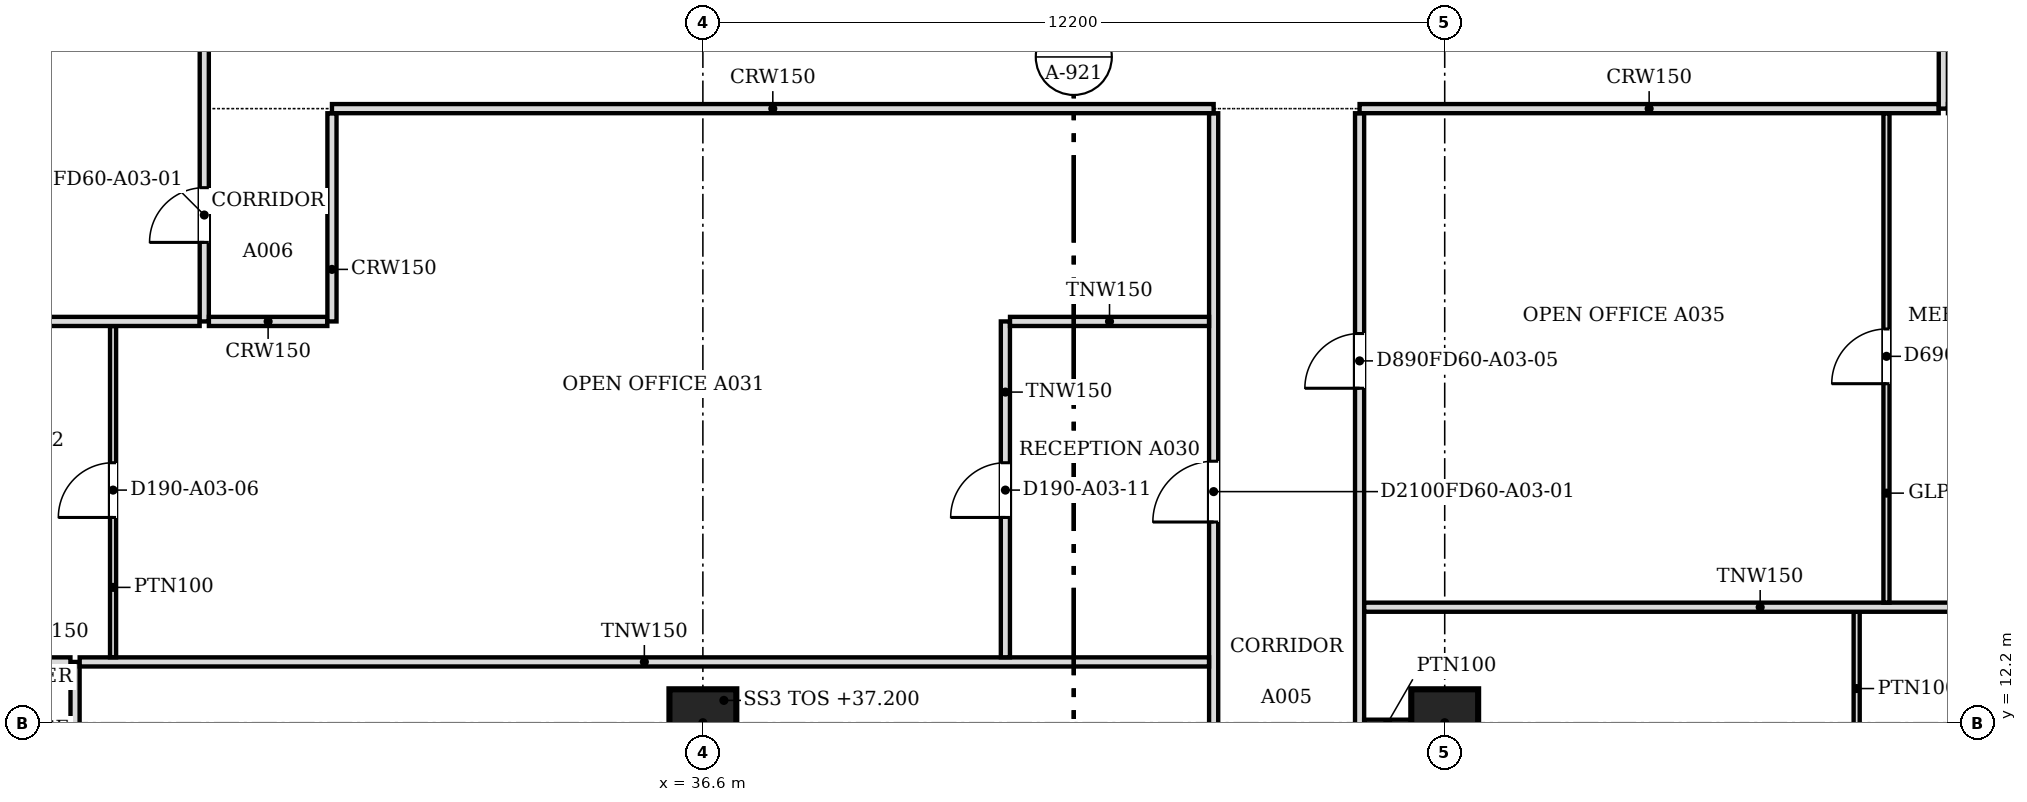
"""IFC4 building model, lengths in metres.
Left out: names, types, materials, properties, quantities, classifications, styles, units other than length and angle.
Written with IfcOpenShell. Run it as: python <this file> out.ifc"""

import sys

from ifc_helpers import new_model, si_unit, direction, frame, frame_2d, origin, origin_2d, place, context, subcontext, project, spatial, rectangle, extrude, source, transform, mapped, element, fill, save


model = new_model("IFC4")
c1 = context("Model", 3, precision=1e-05, world=origin(), true_north=direction((0.0, 1.0)))
c2 = subcontext(c1, "Body", "Model", "MODEL_VIEW")
j1 = project(units=[si_unit("LENGTHUNIT", "METRE"), si_unit("PLANEANGLEUNIT", "RADIAN")], contexts=[c1])
p1 = place(None, origin())
s1 = spatial("IfcSite", under=j1, at=p1, CompositionType="ELEMENT")
p2 = place(p1, origin())
s2 = spatial("IfcBuilding", under=s1, at=p2, CompositionType="ELEMENT")
p3 = place(p2, frame((0.0, 0.0, 37.2)))
s3 = spatial("IfcBuildingStorey", under=s2, at=p3, CompositionType="ELEMENT", Elevation=37.2)
for number, where, z_axis, x_axis in (
    (1, (36.6, 12.2, 0.0), (0.0, 0.0, 1.0), (1.0, 0.0, 0.0)),
    (2, (48.8, 12.2, 0.0), (0.0, 0.0, 1.0), (1.0, 0.0, 0.0)),
):
    element("IfcColumn", number, at=place(p3, frame(where, z_axis=z_axis, x_axis=x_axis)), inside=s3, PredefinedType="COLUMN", context=c2, shape_type="SweptSolid", body=[
        extrude(rectangle(XDim=1.1, YDim=1.1, at=origin_2d()), origin(), (0.0, 0.0, 1.0), 3.6),
    ])
p4 = place(p3, frame((45.0, 0.5, 0.0), z_axis=(0.0, 0.0, 1.0), x_axis=(0.0, 1.0, 0.0)))
e3 = element("IfcWall", 3, at=p4, inside=s3, PredefinedType="PARTITIONING", context=c2, shape_type="SweptSolid", body=[
    extrude(rectangle(XDim=21.724, YDim=0.15, at=frame_2d((10.862, 0.0))), origin(), (0.0, 0.0, 1.0), 3.067),
])
m1 = source(origin(), c2, "Body", "SweptSolid", [
    extrude(rectangle(XDim=1.0, YDim=2.1, at=frame_2d((0.5, 1.05))), frame((0.0, 0.085, 0.0), z_axis=(0.0, -1.0, 0.0), x_axis=(1.0, 0.0, 0.0)), (0.0, 0.0, 1.0), 0.17),
])
p5 = place(p4, frame((15.001, 0.0, 0.0)))
e4 = element("IfcOpeningElement", 4, at=p5, cuts=e3, PredefinedType="OPENING", context=c2, shape_type="MappedRepresentation", body=[
    mapped(m1, transform((0.0, 0.0, 0.0), scale=1.0)),
])
p6 = place(p4, frame((7.7, 0.0, 0.0)))
e5 = element("IfcOpeningElement", 5, at=p6, cuts=e3, PredefinedType="OPENING", context=c2, shape_type="MappedRepresentation", body=[
    mapped(m1, transform((0.0, 0.0, 0.0), scale=1.0)),
])
p7 = place(p3, frame((47.4, 22.224, 0.0), z_axis=(0.0, 0.0, 1.0), x_axis=(0.0, -1.0, 0.0)))
e6 = element("IfcWall", 6, at=p7, inside=s3, PredefinedType="PARTITIONING", context=c2, shape_type="SweptSolid", body=[
    extrude(rectangle(XDim=18.024, YDim=0.15, at=frame_2d((9.012, 0.0))), origin(), (0.0, 0.0, 1.0), 3.067),
])
m2 = source(origin(), c2, "Body", "SweptSolid", [
    extrude(rectangle(XDim=0.9, YDim=2.1, at=frame_2d((0.45, 1.05))), frame((0.0, 0.085, 0.0), z_axis=(0.0, -1.0, 0.0), x_axis=(1.0, 0.0, 0.0)), (0.0, 0.0, 1.0), 0.17),
])
p8 = place(p7, frame((3.623, 0.0, 0.0)))
e7 = element("IfcOpeningElement", 7, at=p8, cuts=e6, PredefinedType="OPENING", context=c2, shape_type="MappedRepresentation", body=[
    mapped(m2, transform((0.0, 0.0, 0.0), scale=1.0)),
])
p9 = place(p7, frame((12.624, 0.0, 0.0)))
e8 = element("IfcOpeningElement", 8, at=p9, cuts=e6, PredefinedType="OPENING", context=c2, shape_type="MappedRepresentation", body=[
    mapped(m2, transform((0.0, 0.0, 0.0), scale=1.0)),
])
p10 = place(p3, frame((55.575, 14.024, 0.0), z_axis=(0.0, 0.0, 1.0), x_axis=(0.0, -1.0, 0.0)))
e9 = element("IfcWall", 9, at=p10, inside=s3, PredefinedType="PARTITIONING", context=c2, shape_type="SweptSolid", body=[
    extrude(rectangle(XDim=5.924, YDim=0.1, at=frame_2d((2.962, 0.0))), origin(), (0.0, 0.0, 1.0), 3.067),
])
m3 = source(origin(), c2, "Body", "SweptSolid", [
    extrude(rectangle(XDim=0.9, YDim=2.1, at=frame_2d((0.45, 1.05))), frame((0.0, 0.06, 0.0), z_axis=(0.0, -1.0, 0.0), x_axis=(1.0, 0.0, 0.0)), (0.0, 0.0, 1.0), 0.12),
])
p11 = place(p10, frame((2.524, 0.0, 0.0)))
e10 = element("IfcOpeningElement", 10, at=p11, cuts=e9, PredefinedType="OPENING", context=c2, shape_type="MappedRepresentation", body=[
    mapped(m3, transform((0.0, 0.0, 0.0), scale=1.0)),
])
p12 = place(p3, frame((26.275, 8.548, 0.0), z_axis=(0.0, 0.0, 1.0), x_axis=(0.0, 1.0, 0.0)))
e11 = element("IfcWall", 11, at=p12, inside=s3, PredefinedType="PARTITIONING", context=c2, shape_type="SweptSolid", body=[
    extrude(rectangle(XDim=4.652, YDim=0.15, at=frame_2d((2.326, 0.0))), origin(), (0.0, 0.0, 1.0), 3.067),
])
p13 = place(p12, frame((1.9, 0.0, 0.0)))
e12 = element("IfcOpeningElement", 12, at=p13, cuts=e11, PredefinedType="OPENING", context=c2, shape_type="MappedRepresentation", body=[
    mapped(m2, transform((0.0, 0.0, 0.0), scale=1.0)),
])
p14 = place(p3, frame((48.25, 12.2, 0.0), z_axis=(0.0, 0.0, 1.0), x_axis=(-1.0, 0.0, 0.0)))
e13 = element("IfcWall", 13, at=p14, inside=s3, PredefinedType="PARTITIONING", context=c2, shape_type="SweptSolid", body=[
    extrude(rectangle(XDim=0.775, YDim=0.1, at=frame_2d((0.387, 0.0))), origin(), (0.0, 0.0, 1.0), 3.067),
])
p15 = place(p3, frame((24.55, 13.2, 0.0), z_axis=(0.0, 0.0, 1.0), x_axis=(1.0, 0.0, 0.0)))
e14 = element("IfcWall", 14, at=p15, inside=s3, PredefinedType="PARTITIONING", context=c2, shape_type="SweptSolid", body=[
    extrude(rectangle(XDim=1.649, YDim=0.15, at=frame_2d((0.824, 0.0))), origin(), (0.0, 0.0, 1.0), 3.067),
])
p16 = place(p3, frame((26.351, 13.2, 0.0), z_axis=(0.0, 0.0, 1.0), x_axis=(1.0, 0.0, 0.0)))
e15 = element("IfcWall", 15, at=p16, inside=s3, PredefinedType="PARTITIONING", context=c2, shape_type="SweptSolid", body=[
    extrude(rectangle(XDim=18.573, YDim=0.15, at=frame_2d((9.287, 0.0))), origin(), (0.0, 0.0, 1.0), 3.067),
])
p17 = place(p3, frame((26.9, 13.276, 0.0), z_axis=(0.0, 0.0, 1.0), x_axis=(0.0, 1.0, 0.0)))
e16 = element("IfcWall", 16, at=p17, inside=s3, PredefinedType="PARTITIONING", context=c2, shape_type="SweptSolid", body=[
    extrude(rectangle(XDim=5.448, YDim=0.1, at=frame_2d((2.724, 0.0))), origin(), (0.0, 0.0, 1.0), 3.067),
])
p18 = place(p17, frame((2.3, 0.0, 0.0)))
e17 = element("IfcOpeningElement", 17, at=p18, cuts=e16, PredefinedType="OPENING", context=c2, shape_type="MappedRepresentation", body=[
    mapped(m3, transform((0.0, 0.0, 0.0), scale=1.0)),
])
p19 = place(p3, frame((41.575, 13.276, 0.0), z_axis=(0.0, 0.0, 1.0), x_axis=(0.0, 1.0, 0.0)))
e18 = element("IfcWall", 18, at=p19, inside=s3, PredefinedType="PARTITIONING", context=c2, shape_type="SweptSolid", body=[
    extrude(rectangle(XDim=5.524, YDim=0.15, at=frame_2d((2.762, 0.0))), origin(), (0.0, 0.0, 1.0), 3.067),
])
p20 = place(p19, frame((2.3, 0.0, 0.0)))
e19 = element("IfcOpeningElement", 19, at=p20, cuts=e18, PredefinedType="OPENING", context=c2, shape_type="MappedRepresentation", body=[
    mapped(m2, transform((0.0, 0.0, 0.0), scale=1.0)),
])
p21 = place(p3, frame((47.476, 14.1, 0.0), z_axis=(0.0, 0.0, 1.0), x_axis=(1.0, 0.0, 0.0)))
e20 = element("IfcWall", 20, at=p21, inside=s3, PredefinedType="PARTITIONING", context=c2, shape_type="SweptSolid", body=[
    extrude(rectangle(XDim=13.024, YDim=0.15, at=frame_2d((6.512, 0.0))), origin(), (0.0, 0.0, 1.0), 3.067),
])
p22 = place(p3, frame((56.065, 22.224, 0.0), z_axis=(0.0, 0.0, 1.0), x_axis=(0.0, -1.0, 0.0)))
e21 = element("IfcWall", 21, at=p22, inside=s3, PredefinedType="PARTITIONING", context=c2, shape_type="SweptSolid", body=[
    extrude(rectangle(XDim=8.048, YDim=0.1, at=frame_2d((4.024, 0.0))), origin(), (0.0, 0.0, 1.0), 3.067),
])
p23 = place(p22, frame((3.548, 0.0, 0.0)))
e22 = element("IfcOpeningElement", 22, at=p23, cuts=e21, PredefinedType="OPENING", context=c2, shape_type="MappedRepresentation", body=[
    mapped(m3, transform((0.0, 0.0, 0.0), scale=1.0)),
])
p24 = place(p3, frame((22.0, 18.8, 0.0), z_axis=(0.0, 0.0, 1.0), x_axis=(1.0, 0.0, 0.0)))
e23 = element("IfcWall", 23, at=p24, inside=s3, PredefinedType="PARTITIONING", context=c2, shape_type="SweptSolid", body=[
    extrude(rectangle(XDim=6.324, YDim=0.15, at=frame_2d((3.162, 0.0))), origin(), (0.0, 0.0, 1.0), 3.067),
])
p25 = place(p3, frame((28.4, 18.8, 0.0), z_axis=(0.0, 0.0, 1.0), x_axis=(0.0, 1.0, 0.0)))
e24 = element("IfcWall", 24, at=p25, inside=s3, PredefinedType="PARTITIONING", context=c2, shape_type="SweptSolid", body=[
    extrude(rectangle(XDim=26.824, YDim=0.15, at=frame_2d((13.412, 0.0))), origin(), (0.0, 0.0, 1.0), 3.067),
])
p26 = place(p25, frame((1.3, 0.0, 0.0)))
e25 = element("IfcOpeningElement", 25, at=p26, cuts=e24, PredefinedType="OPENING", context=c2, shape_type="MappedRepresentation", body=[
    mapped(m2, transform((0.0, 0.0, 0.0), scale=1.0)),
])
p27 = place(p25, frame((14.301, 0.0, 0.0)))
e26 = element("IfcOpeningElement", 26, at=p27, cuts=e24, PredefinedType="OPENING", context=c2, shape_type="MappedRepresentation", body=[
    mapped(m2, transform((0.0, 0.0, 0.0), scale=1.0)),
])
p28 = place(p25, frame((8.2, 0.0, 0.0)))
e27 = element("IfcOpeningElement", 27, at=p28, cuts=e24, PredefinedType="OPENING", context=c2, shape_type="MappedRepresentation", body=[
    mapped(m2, transform((0.0, 0.0, 0.0), scale=1.0)),
])
p29 = place(p25, frame((21.9, 0.0, 0.0)))
e28 = element("IfcOpeningElement", 28, at=p29, cuts=e24, PredefinedType="OPENING", context=c2, shape_type="MappedRepresentation", body=[
    mapped(m2, transform((0.0, 0.0, 0.0), scale=1.0)),
])
p30 = place(p3, frame((28.476, 18.8, 0.0), z_axis=(0.0, 0.0, 1.0), x_axis=(1.0, 0.0, 0.0)))
e29 = element("IfcWall", 29, at=p30, inside=s3, PredefinedType="PARTITIONING", context=c2, shape_type="SweptSolid", body=[
    extrude(rectangle(XDim=1.948, YDim=0.15, at=frame_2d((0.974, 0.0))), origin(), (0.0, 0.0, 1.0), 3.067),
])
p31 = place(p3, frame((30.5, 18.8, 0.0), z_axis=(0.0, 0.0, 1.0), x_axis=(0.0, 1.0, 0.0)))
e30 = element("IfcWall", 30, at=p31, inside=s3, PredefinedType="PARTITIONING", context=c2, shape_type="SweptSolid", body=[
    extrude(rectangle(XDim=3.424, YDim=0.15, at=frame_2d((1.712, 0.0))), origin(), (0.0, 0.0, 1.0), 3.067),
])
p32 = place(p3, frame((41.651, 18.8, 0.0), z_axis=(0.0, 0.0, 1.0), x_axis=(1.0, 0.0, 0.0)))
e31 = element("IfcWall", 31, at=p32, inside=s3, PredefinedType="PARTITIONING", context=c2, shape_type="SweptSolid", body=[
    extrude(rectangle(XDim=3.273, YDim=0.15, at=frame_2d((1.637, 0.0))), origin(), (0.0, 0.0, 1.0), 3.067),
])
p33 = place(p3, frame((30.5, 22.3, 0.0), z_axis=(0.0, 0.0, 1.0), x_axis=(1.0, 0.0, 0.0)))
e32 = element("IfcWall", 32, at=p33, inside=s3, PredefinedType="PARTITIONING", context=c2, shape_type="SweptSolid", body=[
    extrude(rectangle(XDim=14.5, YDim=0.15, at=frame_2d((7.25, 0.0))), origin(), (0.0, 0.0, 1.0), 3.067),
])
p34 = place(p3, frame((47.4, 22.3, 0.0), z_axis=(0.0, 0.0, 1.0), x_axis=(1.0, 0.0, 0.0)))
e33 = element("IfcWall", 33, at=p34, inside=s3, PredefinedType="PARTITIONING", context=c2, shape_type="SweptSolid", body=[
    extrude(rectangle(XDim=9.524, YDim=0.15, at=frame_2d((4.762, 0.0))), origin(), (0.0, 0.0, 1.0), 3.067),
])
p35 = place(p3, frame((57.0, 30.6, 0.0), z_axis=(0.0, 0.0, 1.0), x_axis=(0.0, -1.0, 0.0)))
e34 = element("IfcWall", 34, at=p35, inside=s3, PredefinedType="PARTITIONING", context=c2, shape_type="SweptSolid", body=[
    extrude(rectangle(XDim=8.3, YDim=0.15, at=frame_2d((4.15, 0.0))), origin(), (0.0, 0.0, 1.0), 3.067),
])
p36 = place(p35, frame((3.7, 0.0, 0.0)))
e35 = element("IfcOpeningElement", 35, at=p36, cuts=e34, PredefinedType="OPENING", context=c2, shape_type="MappedRepresentation", body=[
    mapped(m2, transform((0.0, 0.0, 0.0), scale=1.0)),
])
m4 = source(origin(), c2, "Body", "SweptSolid", [
    extrude(rectangle(XDim=0.9, YDim=2.1, at=frame_2d((0.45, 1.05))), frame((0.0, 0.025, 0.0), z_axis=(0.0, -1.0, 0.0), x_axis=(1.0, 0.0, 0.0)), (0.0, 0.0, 1.0), 0.05),
])
p37 = place(p26, origin())
e36 = element("IfcDoor", 36, at=p37, inside=s3, OperationType="SINGLE_SWING_LEFT", PredefinedType="DOOR", context=c2, shape_type="MappedRepresentation", body=[
    mapped(m4, transform((0.0, 0.0, 0.0), scale=1.0)),
])
fill(e25, e36)
p38 = place(p18, origin())
e37 = element("IfcDoor", 37, at=p38, inside=s3, OperationType="SINGLE_SWING_LEFT", PredefinedType="DOOR", context=c2, shape_type="MappedRepresentation", body=[
    mapped(m4, transform((0.0, 0.0, 0.0), scale=1.0)),
])
fill(e17, e37)
m5 = source(origin(), c2, "Body", "SweptSolid", [
    extrude(rectangle(XDim=1.0, YDim=2.1, at=frame_2d((0.5, 1.05))), frame((0.0, 0.025, 0.0), z_axis=(0.0, -1.0, 0.0), x_axis=(1.0, 0.0, 0.0)), (0.0, 0.0, 1.0), 0.05),
])
p39 = place(p5, origin())
e38 = element("IfcDoor", 38, at=p39, inside=s3, OperationType="SINGLE_SWING_LEFT", PredefinedType="DOOR", context=c2, shape_type="MappedRepresentation", body=[
    mapped(m5, transform((0.0, 0.0, 0.0), scale=1.0)),
])
fill(e4, e38)
p40 = place(p23, origin())
e39 = element("IfcDoor", 39, at=p40, inside=s3, OperationType="SINGLE_SWING_RIGHT", PredefinedType="DOOR", context=c2, shape_type="MappedRepresentation", body=[
    mapped(m4, transform((0.0, 0.0, 0.0), scale=1.0)),
])
fill(e22, e39)
p41 = place(p8, origin())
e40 = element("IfcDoor", 40, at=p41, inside=s3, OperationType="SINGLE_SWING_RIGHT", PredefinedType="DOOR", context=c2, shape_type="MappedRepresentation", body=[
    mapped(m4, transform((0.0, 0.0, 0.0), scale=1.0)),
])
fill(e7, e40)
p42 = place(p20, origin())
e41 = element("IfcDoor", 41, at=p42, inside=s3, OperationType="SINGLE_SWING_LEFT", PredefinedType="DOOR", context=c2, shape_type="MappedRepresentation", body=[
    mapped(m4, transform((0.0, 0.0, 0.0), scale=1.0)),
])
fill(e19, e41)
save(model, sys.argv[1])
